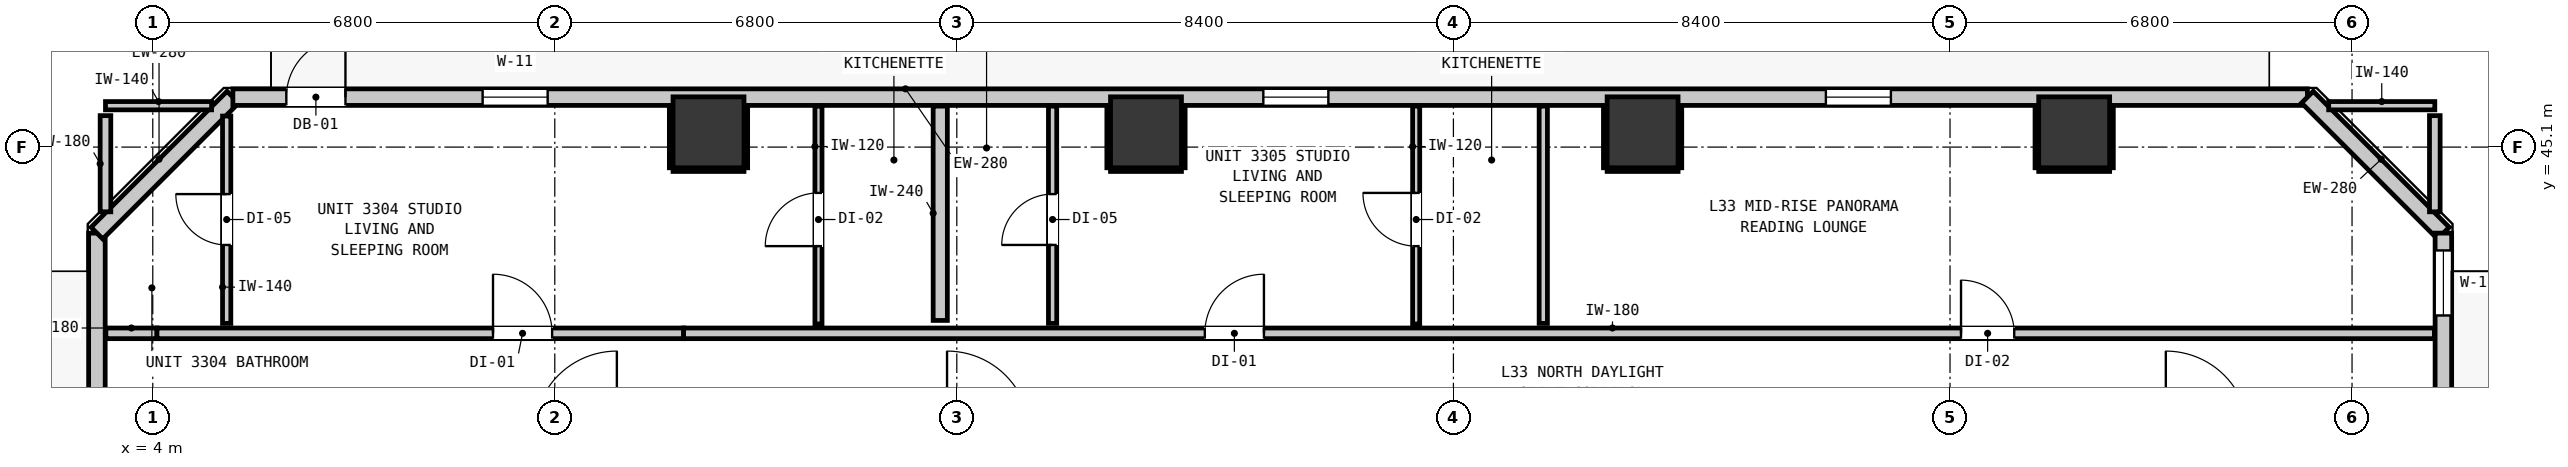
"""IFC4 building model, lengths in metres.
Left out: names, types, materials, properties, quantities, classifications, styles, units other than length and angle.
Written with IfcOpenShell. Run it as: python <this file> out.ifc"""

import sys

from ifc_helpers import new_model, si_unit, direction, frame, frame_2d, origin, origin_2d, place, context, subcontext, project, spatial, rectangle, extrude, element, fill, save


model = new_model("IFC4")
c1 = context("Model", 3, precision=1e-05, world=origin(), true_north=direction((0.0, 1.0)))
c2 = subcontext(c1, "Body", "Model", "MODEL_VIEW")
j1 = project(units=[si_unit("LENGTHUNIT", "METRE"), si_unit("PLANEANGLEUNIT", "RADIAN")], contexts=[c1])
p1 = place(None, origin())
s1 = spatial("IfcSite", under=j1, at=p1, CompositionType="ELEMENT")
p2 = place(p1, origin())
s2 = spatial("IfcBuilding", under=s1, at=p2, CompositionType="ELEMENT")
p3 = place(p2, frame((0.0, 0.0, 116.04)))
s3 = spatial("IfcBuildingStorey", under=s2, at=p3, CompositionType="ELEMENT", Elevation=116.04)
for number, where, z_axis, x_axis in (
    (1, (13.4, 45.35, 0.0), (0.0, 0.0, 1.0), (1.0, 0.0, 0.0)),
    (2, (20.8, 45.35, 0.0), (0.0, 0.0, 1.0), (1.0, 0.0, 0.0)),
    (3, (29.2, 45.35, 0.0), (0.0, 0.0, 1.0), (1.0, 0.0, 0.0)),
    (4, (36.5, 45.35, 0.0), (0.0, 0.0, 1.0), (1.0, 0.0, 0.0)),
):
    element("IfcColumn", number, at=place(p3, frame(where, z_axis=z_axis, x_axis=x_axis)), inside=s3, PredefinedType="COLUMN", context=c2, shape_type="SweptSolid", body=[
        extrude(rectangle(XDim=1.2, YDim=1.2, at=origin_2d()), origin(), (0.0, 0.0, 1.0), 3.32),
    ])
p4 = place(p3, frame((3.055, 11.355, 0.0), z_axis=(0.0, 0.0, 1.0), x_axis=(0.0, 1.0, 0.0)))
e5 = element("IfcWall", 5, at=p4, inside=s3, PredefinedType="STANDARD", context=c2, shape_type="SweptSolid", body=[
    extrude(rectangle(XDim=32.29, YDim=0.28, at=frame_2d((16.145, 0.0))), origin(), (0.0, 0.0, 1.0), 3.08),
])
p5 = place(p4, frame((5.818, 0.0, 0.0)))
e6 = element("IfcOpeningElement", 6, at=p5, cuts=e5, PredefinedType="OPENING", context=c2, shape_type="SweptSolid", body=[
    extrude(rectangle(XDim=1.0, YDim=2.15, at=frame_2d((0.5, 1.075))), frame((0.0, 0.15, 0.0), z_axis=(0.0, -1.0, 0.0), x_axis=(1.0, 0.0, 0.0)), (0.0, 0.0, 1.0), 0.3),
])
p6 = place(p4, frame((0.52, 0.0, 0.85)))
e7 = element("IfcOpeningElement", 7, at=p6, cuts=e5, PredefinedType="OPENING", context=c2, shape_type="SweptSolid", body=[
    extrude(rectangle(XDim=1.1, YDim=2.05, at=frame_2d((0.55, 1.025))), frame((0.0, 0.15, 0.0), z_axis=(0.0, -1.0, 0.0), x_axis=(1.0, 0.0, 0.0)), (0.0, 0.0, 1.0), 0.3),
])
p7 = place(p4, frame((20.905, 0.0, 0.85)))
e8 = element("IfcOpeningElement", 8, at=p7, cuts=e5, PredefinedType="OPENING", context=c2, shape_type="SweptSolid", body=[
    extrude(rectangle(XDim=1.1, YDim=2.05, at=frame_2d((0.55, 1.025))), frame((0.0, 0.15, 0.0), z_axis=(0.0, -1.0, 0.0), x_axis=(1.0, 0.0, 0.0)), (0.0, 0.0, 1.0), 0.3),
])
p8 = place(p4, frame((12.735, 0.0, 0.85)))
e9 = element("IfcOpeningElement", 9, at=p8, cuts=e5, PredefinedType="OPENING", context=c2, shape_type="SweptSolid", body=[
    extrude(rectangle(XDim=1.1, YDim=2.05, at=frame_2d((0.55, 1.025))), frame((0.0, 0.15, 0.0), z_axis=(0.0, -1.0, 0.0), x_axis=(1.0, 0.0, 0.0)), (0.0, 0.0, 1.0), 0.3),
])
p9 = place(p4, frame((24.855, 0.0, 0.85)))
e10 = element("IfcOpeningElement", 10, at=p9, cuts=e5, PredefinedType="OPENING", context=c2, shape_type="SweptSolid", body=[
    extrude(rectangle(XDim=1.1, YDim=2.05, at=frame_2d((0.55, 1.025))), frame((0.0, 0.15, 0.0), z_axis=(0.0, -1.0, 0.0), x_axis=(1.0, 0.0, 0.0)), (0.0, 0.0, 1.0), 0.3),
])
p10 = place(p3, frame((3.055, 43.645, 0.0), z_axis=(0.0, 0.0, 1.0), x_axis=(0.707106781187, 0.707106781187, 0.0)))
e11 = element("IfcWall", 11, at=p10, inside=s3, PredefinedType="STANDARD", context=c2, shape_type="SweptSolid", body=[
    extrude(rectangle(XDim=3.253, YDim=0.28, at=frame_2d((1.626, 0.0))), origin(), (0.0, 0.0, 1.0), 3.08),
])
p11 = place(p3, frame((5.355, 45.945, 0.0), z_axis=(0.0, 0.0, 1.0), x_axis=(1.0, 0.0, 0.0)))
e12 = element("IfcWall", 12, at=p11, inside=s3, PredefinedType="STANDARD", context=c2, shape_type="SweptSolid", body=[
    extrude(rectangle(XDim=35.09, YDim=0.28, at=frame_2d((17.545, 0.0))), origin(), (0.0, 0.0, 1.0), 3.08),
])
p12 = place(p11, frame((0.904, 0.0, 0.0)))
e13 = element("IfcOpeningElement", 13, at=p12, cuts=e12, PredefinedType="OPENING", context=c2, shape_type="SweptSolid", body=[
    extrude(rectangle(XDim=1.0, YDim=2.15, at=frame_2d((0.5, 1.075))), frame((0.0, 0.15, 0.0), z_axis=(0.0, -1.0, 0.0), x_axis=(1.0, 0.0, 0.0)), (0.0, 0.0, 1.0), 0.3),
])
p13 = place(p11, frame((4.224, 0.0, 0.85)))
e14 = element("IfcOpeningElement", 14, at=p13, cuts=e12, PredefinedType="OPENING", context=c2, shape_type="SweptSolid", body=[
    extrude(rectangle(XDim=1.1, YDim=2.05, at=frame_2d((0.55, 1.025))), frame((0.0, 0.15, 0.0), z_axis=(0.0, -1.0, 0.0), x_axis=(1.0, 0.0, 0.0)), (0.0, 0.0, 1.0), 0.3),
])
p14 = place(p11, frame((17.43, 0.0, 0.85)))
e15 = element("IfcOpeningElement", 15, at=p14, cuts=e12, PredefinedType="OPENING", context=c2, shape_type="SweptSolid", body=[
    extrude(rectangle(XDim=1.1, YDim=2.05, at=frame_2d((0.55, 1.025))), frame((0.0, 0.15, 0.0), z_axis=(0.0, -1.0, 0.0), x_axis=(1.0, 0.0, 0.0)), (0.0, 0.0, 1.0), 0.3),
])
p15 = place(p11, frame((26.945, 0.0, 0.85)))
e16 = element("IfcOpeningElement", 16, at=p15, cuts=e12, PredefinedType="OPENING", context=c2, shape_type="SweptSolid", body=[
    extrude(rectangle(XDim=1.1, YDim=2.05, at=frame_2d((0.55, 1.025))), frame((0.0, 0.15, 0.0), z_axis=(0.0, -1.0, 0.0), x_axis=(1.0, 0.0, 0.0)), (0.0, 0.0, 1.0), 0.3),
])
p16 = place(p3, frame((40.445, 45.945, 0.0), z_axis=(0.0, 0.0, 1.0), x_axis=(0.707106781187, -0.707106781187, 0.0)))
e17 = element("IfcWall", 17, at=p16, inside=s3, PredefinedType="STANDARD", context=c2, shape_type="SweptSolid", body=[
    extrude(rectangle(XDim=3.253, YDim=0.28, at=frame_2d((1.626, 0.0))), origin(), (0.0, 0.0, 1.0), 3.08),
])
p17 = place(p3, frame((42.745, 43.645, 0.0), z_axis=(0.0, 0.0, 1.0), x_axis=(0.0, -1.0, 0.0)))
e18 = element("IfcWall", 18, at=p17, inside=s3, PredefinedType="STANDARD", context=c2, shape_type="SweptSolid", body=[
    extrude(rectangle(XDim=32.29, YDim=0.28, at=frame_2d((16.145, 0.0))), origin(), (0.0, 0.0, 1.0), 3.08),
])
p18 = place(p17, frame((5.467, 0.0, 0.0)))
e19 = element("IfcOpeningElement", 19, at=p18, cuts=e18, PredefinedType="OPENING", context=c2, shape_type="SweptSolid", body=[
    extrude(rectangle(XDim=1.0, YDim=2.15, at=frame_2d((0.5, 1.075))), frame((0.0, 0.15, 0.0), z_axis=(0.0, -1.0, 0.0), x_axis=(1.0, 0.0, 0.0)), (0.0, 0.0, 1.0), 0.3),
])
p19 = place(p17, frame((0.293, 0.0, 0.85)))
e20 = element("IfcOpeningElement", 20, at=p19, cuts=e18, PredefinedType="OPENING", context=c2, shape_type="SweptSolid", body=[
    extrude(rectangle(XDim=1.1, YDim=2.05, at=frame_2d((0.55, 1.025))), frame((0.0, 0.15, 0.0), z_axis=(0.0, -1.0, 0.0), x_axis=(1.0, 0.0, 0.0)), (0.0, 0.0, 1.0), 0.3),
])
p20 = place(p17, frame((14.773, 0.0, 0.85)))
e21 = element("IfcOpeningElement", 21, at=p20, cuts=e18, PredefinedType="OPENING", context=c2, shape_type="SweptSolid", body=[
    extrude(rectangle(XDim=1.1, YDim=2.05, at=frame_2d((0.55, 1.025))), frame((0.0, 0.15, 0.0), z_axis=(0.0, -1.0, 0.0), x_axis=(1.0, 0.0, 0.0)), (0.0, 0.0, 1.0), 0.3),
])
p21 = place(p3, frame((3.207, 41.95, 0.0), z_axis=(0.0, 0.0, 1.0), x_axis=(1.0, 0.0, 0.0)))
e22 = element("IfcWall", 22, at=p21, inside=s3, PredefinedType="PARTITIONING", context=c2, shape_type="SweptSolid", body=[
    extrude(rectangle(XDim=0.864, YDim=0.18, at=frame_2d((0.432, 0.0))), origin(), (0.0, 0.0, 1.0), 3.08),
])
p22 = place(p3, frame((4.071, 41.95, 0.0), z_axis=(0.0, 0.0, 1.0), x_axis=(1.0, 0.0, 0.0)))
e23 = element("IfcWall", 23, at=p22, inside=s3, PredefinedType="PARTITIONING", context=c2, shape_type="SweptSolid", body=[
    extrude(rectangle(XDim=8.908, YDim=0.18, at=frame_2d((4.454, 0.0))), origin(), (0.0, 0.0, 1.0), 2.565),
])
p23 = place(p22, frame((5.684, 0.0, 0.0)))
e24 = element("IfcOpeningElement", 24, at=p23, cuts=e23, PredefinedType="OPENING", context=c2, shape_type="SweptSolid", body=[
    extrude(rectangle(XDim=1.0, YDim=2.15, at=frame_2d((0.5, 1.075))), frame((0.0, 0.1, 0.0), z_axis=(0.0, -1.0, 0.0), x_axis=(1.0, 0.0, 0.0)), (0.0, 0.0, 1.0), 0.2),
])
p24 = place(p3, frame((12.979, 41.95, 0.0), z_axis=(0.0, 0.0, 1.0), x_axis=(1.0, 0.0, 0.0)))
e25 = element("IfcWall", 25, at=p24, inside=s3, PredefinedType="PARTITIONING", context=c2, shape_type="SweptSolid", body=[
    extrude(rectangle(XDim=29.614, YDim=0.18, at=frame_2d((14.807, 0.0))), origin(), (0.0, 0.0, 1.0), 3.08),
])
p25 = place(p24, frame((8.816, 0.0, 0.0)))
e26 = element("IfcOpeningElement", 26, at=p25, cuts=e25, PredefinedType="OPENING", context=c2, shape_type="SweptSolid", body=[
    extrude(rectangle(XDim=1.0, YDim=2.15, at=frame_2d((0.5, 1.075))), frame((0.0, 0.1, 0.0), z_axis=(0.0, -1.0, 0.0), x_axis=(1.0, 0.0, 0.0)), (0.0, 0.0, 1.0), 0.2),
])
p26 = place(p24, frame((21.607, 0.0, 0.0)))
e27 = element("IfcOpeningElement", 27, at=p26, cuts=e25, PredefinedType="OPENING", context=c2, shape_type="SweptSolid", body=[
    extrude(rectangle(XDim=0.9, YDim=2.1, at=frame_2d((0.45, 1.05))), frame((0.0, 0.1, 0.0), z_axis=(0.0, -1.0, 0.0), x_axis=(1.0, 0.0, 0.0)), (0.0, 0.0, 1.0), 0.2),
])
for number, where, z_axis, x_axis in (
    (28, (3.2, 45.8, 0.0), (0.0, 0.0, 1.0), (1.0, 0.0, 0.0)),
    (29, (40.805, 45.8, 0.0), (0.0, 0.0, 1.0), (1.0, 0.0, 0.0)),
):
    element("IfcWall", number, at=place(p3, frame(where, z_axis=z_axis, x_axis=x_axis)), inside=s3, PredefinedType="PARTITIONING", context=c2, shape_type="SweptSolid", body=[
        extrude(rectangle(XDim=1.795, YDim=0.14, at=frame_2d((0.897, 0.0))), origin(), (0.0, 0.0, 1.0), 3.08),
    ])
p27 = place(p3, frame((17.32, 42.168, 0.0), z_axis=(0.0, 0.0, 1.0), x_axis=(0.0, 1.0, 0.0)))
e30 = element("IfcWall", 30, at=p27, inside=s3, PredefinedType="PARTITIONING", context=c2, shape_type="SweptSolid", body=[
    extrude(rectangle(XDim=3.625, YDim=0.24, at=frame_2d((1.812, 0.0))), origin(), (0.0, 0.0, 1.0), 3.08),
])
for number, where, z_axis, x_axis in (
    (31, (3.2, 44.005, 0.0), (0.0, 0.0, 1.0), (0.0, 1.0, 0.0)),
    (32, (42.6, 44.005, 0.0), (0.0, 0.0, 1.0), (0.0, 1.0, 0.0)),
):
    element("IfcWall", number, at=place(p3, frame(where, z_axis=z_axis, x_axis=x_axis)), inside=s3, PredefinedType="PARTITIONING", context=c2, shape_type="SweptSolid", body=[
        extrude(rectangle(XDim=1.627, YDim=0.18, at=frame_2d((0.813, 0.0))), origin(), (0.0, 0.0, 1.0), 3.08),
    ])
p28 = place(p3, frame((5.25, 42.118, 0.0), z_axis=(0.0, 0.0, 1.0), x_axis=(0.0, 1.0, 0.0)))
e33 = element("IfcWall", 33, at=p28, inside=s3, PredefinedType="PARTITIONING", context=c2, shape_type="SweptSolid", body=[
    extrude(rectangle(XDim=3.507, YDim=0.14, at=frame_2d((1.753, 0.0))), origin(), (0.0, 0.0, 1.0), 3.08),
])
p29 = place(p28, frame((1.327, 0.0, 0.0)))
e34 = element("IfcOpeningElement", 34, at=p29, cuts=e33, PredefinedType="OPENING", context=c2, shape_type="SweptSolid", body=[
    extrude(rectangle(XDim=0.86, YDim=2.02, at=frame_2d((0.43, 1.01))), frame((0.0, 0.08, 0.0), z_axis=(0.0, -1.0, 0.0), x_axis=(1.0, 0.0, 0.0)), (0.0, 0.0, 1.0), 0.16),
])
p30 = place(p3, frame((19.22, 42.118, 0.0), z_axis=(0.0, 0.0, 1.0), x_axis=(0.0, 1.0, 0.0)))
e35 = element("IfcWall", 35, at=p30, inside=s3, PredefinedType="PARTITIONING", context=c2, shape_type="SweptSolid", body=[
    extrude(rectangle(XDim=3.675, YDim=0.14, at=frame_2d((1.837, 0.0))), origin(), (0.0, 0.0, 1.0), 3.08),
])
p31 = place(p30, frame((1.327, 0.0, 0.0)))
e36 = element("IfcOpeningElement", 36, at=p31, cuts=e35, PredefinedType="OPENING", context=c2, shape_type="SweptSolid", body=[
    extrude(rectangle(XDim=0.86, YDim=2.02, at=frame_2d((0.43, 1.01))), frame((0.0, 0.08, 0.0), z_axis=(0.0, -1.0, 0.0), x_axis=(1.0, 0.0, 0.0)), (0.0, 0.0, 1.0), 0.16),
])
p32 = place(p3, frame((27.52, 42.118, 0.0), z_axis=(0.0, 0.0, 1.0), x_axis=(0.0, 1.0, 0.0)))
e37 = element("IfcWall", 37, at=p32, inside=s3, PredefinedType="PARTITIONING", context=c2, shape_type="SweptSolid", body=[
    extrude(rectangle(XDim=3.675, YDim=0.14, at=frame_2d((1.837, 0.0))), origin(), (0.0, 0.0, 1.0), 3.08),
])
p33 = place(p3, frame((15.26, 42.108, 0.0), z_axis=(0.0, 0.0, 1.0), x_axis=(0.0, 1.0, 0.0)))
e38 = element("IfcWall", 38, at=p33, inside=s3, PredefinedType="PARTITIONING", context=c2, shape_type="SweptSolid", body=[
    extrude(rectangle(XDim=3.685, YDim=0.12, at=frame_2d((1.843, 0.0))), origin(), (0.0, 0.0, 1.0), 3.08),
])
p34 = place(p33, frame((1.317, 0.0, 0.0)))
e39 = element("IfcOpeningElement", 39, at=p34, cuts=e38, PredefinedType="OPENING", context=c2, shape_type="SweptSolid", body=[
    extrude(rectangle(XDim=0.9, YDim=2.1, at=frame_2d((0.45, 1.05))), frame((0.0, 0.07, 0.0), z_axis=(0.0, -1.0, 0.0), x_axis=(1.0, 0.0, 0.0)), (0.0, 0.0, 1.0), 0.14),
])
p35 = place(p3, frame((25.37, 42.108, 0.0), z_axis=(0.0, 0.0, 1.0), x_axis=(0.0, 1.0, 0.0)))
e40 = element("IfcWall", 40, at=p35, inside=s3, PredefinedType="PARTITIONING", context=c2, shape_type="SweptSolid", body=[
    extrude(rectangle(XDim=3.685, YDim=0.12, at=frame_2d((1.843, 0.0))), origin(), (0.0, 0.0, 1.0), 3.08),
])
p36 = place(p35, frame((1.317, 0.0, 0.0)))
e41 = element("IfcOpeningElement", 41, at=p36, cuts=e40, PredefinedType="OPENING", context=c2, shape_type="SweptSolid", body=[
    extrude(rectangle(XDim=0.9, YDim=2.1, at=frame_2d((0.45, 1.05))), frame((0.0, 0.07, 0.0), z_axis=(0.0, -1.0, 0.0), x_axis=(1.0, 0.0, 0.0)), (0.0, 0.0, 1.0), 0.14),
])
p37 = place(p3, frame((12.8, 44.718, 0.0), z_axis=(0.0, 0.0, 1.0), x_axis=(1.0, 0.0, 0.0)))
e42 = element("IfcWall", 42, at=p37, inside=s3, PredefinedType="PARTITIONING", context=c2, shape_type="SweptSolid", body=[
    extrude(rectangle(XDim=1.2, YDim=0.06, at=frame_2d((0.6, 0.0))), origin(), (0.0, 0.0, 1.0), 1.45),
])
for number, where, z_axis, x_axis in (
    (43, (12.768, 44.75, 0.0), (0.0, 0.0, 1.0), (0.0, 1.0, 0.0)),
    (44, (14.032, 44.75, 0.0), (0.0, 0.0, 1.0), (0.0, 1.0, 0.0)),
):
    element("IfcWall", number, at=place(p3, frame(where, z_axis=z_axis, x_axis=x_axis)), inside=s3, PredefinedType="PARTITIONING", context=c2, shape_type="SweptSolid", body=[
        extrude(rectangle(XDim=1.04, YDim=0.06, at=frame_2d((0.52, 0.0))), origin(), (0.0, 0.0, 1.0), 1.45),
    ])
p38 = place(p3, frame((20.2, 44.718, 0.0), z_axis=(0.0, 0.0, 1.0), x_axis=(1.0, 0.0, 0.0)))
e45 = element("IfcWall", 45, at=p38, inside=s3, PredefinedType="PARTITIONING", context=c2, shape_type="SweptSolid", body=[
    extrude(rectangle(XDim=1.2, YDim=0.06, at=frame_2d((0.6, 0.0))), origin(), (0.0, 0.0, 1.0), 1.45),
])
for number, where, z_axis, x_axis in (
    (46, (20.168, 44.75, 0.0), (0.0, 0.0, 1.0), (0.0, 1.0, 0.0)),
    (47, (21.432, 44.75, 0.0), (0.0, 0.0, 1.0), (0.0, 1.0, 0.0)),
):
    element("IfcWall", number, at=place(p3, frame(where, z_axis=z_axis, x_axis=x_axis)), inside=s3, PredefinedType="PARTITIONING", context=c2, shape_type="SweptSolid", body=[
        extrude(rectangle(XDim=1.04, YDim=0.06, at=frame_2d((0.52, 0.0))), origin(), (0.0, 0.0, 1.0), 1.45),
    ])
p39 = place(p3, frame((28.6, 44.718, 0.0), z_axis=(0.0, 0.0, 1.0), x_axis=(1.0, 0.0, 0.0)))
e48 = element("IfcWall", 48, at=p39, inside=s3, PredefinedType="PARTITIONING", context=c2, shape_type="SweptSolid", body=[
    extrude(rectangle(XDim=1.2, YDim=0.06, at=frame_2d((0.6, 0.0))), origin(), (0.0, 0.0, 1.0), 1.45),
])
for number, where, z_axis, x_axis in (
    (49, (28.568, 44.75, 0.0), (0.0, 0.0, 1.0), (0.0, 1.0, 0.0)),
    (50, (29.832, 44.75, 0.0), (0.0, 0.0, 1.0), (0.0, 1.0, 0.0)),
):
    element("IfcWall", number, at=place(p3, frame(where, z_axis=z_axis, x_axis=x_axis)), inside=s3, PredefinedType="PARTITIONING", context=c2, shape_type="SweptSolid", body=[
        extrude(rectangle(XDim=1.04, YDim=0.06, at=frame_2d((0.52, 0.0))), origin(), (0.0, 0.0, 1.0), 1.45),
    ])
p40 = place(p3, frame((35.9, 44.718, 0.0), z_axis=(0.0, 0.0, 1.0), x_axis=(1.0, 0.0, 0.0)))
e51 = element("IfcWall", 51, at=p40, inside=s3, PredefinedType="PARTITIONING", context=c2, shape_type="SweptSolid", body=[
    extrude(rectangle(XDim=1.2, YDim=0.06, at=frame_2d((0.6, 0.0))), origin(), (0.0, 0.0, 1.0), 1.45),
])
for number, where, z_axis, x_axis in (
    (52, (35.868, 44.75, 0.0), (0.0, 0.0, 1.0), (0.0, 1.0, 0.0)),
    (53, (37.132, 44.75, 0.0), (0.0, 0.0, 1.0), (0.0, 1.0, 0.0)),
):
    element("IfcWall", number, at=place(p3, frame(where, z_axis=z_axis, x_axis=x_axis)), inside=s3, PredefinedType="PARTITIONING", context=c2, shape_type="SweptSolid", body=[
        extrude(rectangle(XDim=1.04, YDim=0.06, at=frame_2d((0.52, 0.0))), origin(), (0.0, 0.0, 1.0), 1.45),
    ])
p41 = place(p12, origin())
e54 = element("IfcDoor", 54, at=p41, inside=s3, OperationType="SINGLE_SWING_RIGHT", PredefinedType="DOOR", context=c2, shape_type="SweptSolid", body=[
    extrude(rectangle(XDim=1.0, YDim=2.15, at=frame_2d((0.5, 1.075))), frame((0.0, 0.025, 0.0), z_axis=(0.0, -1.0, 0.0), x_axis=(1.0, 0.0, 0.0)), (0.0, 0.0, 1.0), 0.05),
])
fill(e13, e54)
p42 = place(p13, origin())
e55 = element("IfcWindow", 55, at=p42, inside=s3, PartitioningType="SINGLE_PANEL", PredefinedType="WINDOW", context=c2, shape_type="SweptSolid", body=[
    extrude(rectangle(XDim=1.1, YDim=2.05, at=frame_2d((0.55, 1.025))), frame((0.0, 0.03, 0.0), z_axis=(0.0, -1.0, 0.0), x_axis=(1.0, 0.0, 0.0)), (0.0, 0.0, 1.0), 0.06),
])
fill(e14, e55)
p43 = place(p14, origin())
e56 = element("IfcWindow", 56, at=p43, inside=s3, PartitioningType="SINGLE_PANEL", PredefinedType="WINDOW", context=c2, shape_type="SweptSolid", body=[
    extrude(rectangle(XDim=1.1, YDim=2.05, at=frame_2d((0.55, 1.025))), frame((0.0, 0.03, 0.0), z_axis=(0.0, -1.0, 0.0), x_axis=(1.0, 0.0, 0.0)), (0.0, 0.0, 1.0), 0.06),
])
fill(e15, e56)
p44 = place(p15, origin())
e57 = element("IfcWindow", 57, at=p44, inside=s3, PartitioningType="SINGLE_PANEL", PredefinedType="WINDOW", context=c2, shape_type="SweptSolid", body=[
    extrude(rectangle(XDim=1.1, YDim=2.05, at=frame_2d((0.55, 1.025))), frame((0.0, 0.03, 0.0), z_axis=(0.0, -1.0, 0.0), x_axis=(1.0, 0.0, 0.0)), (0.0, 0.0, 1.0), 0.06),
])
fill(e16, e57)
p45 = place(p19, origin())
e58 = element("IfcWindow", 58, at=p45, inside=s3, PartitioningType="SINGLE_PANEL", PredefinedType="WINDOW", context=c2, shape_type="SweptSolid", body=[
    extrude(rectangle(XDim=1.1, YDim=2.05, at=frame_2d((0.55, 1.025))), frame((0.0, 0.03, 0.0), z_axis=(0.0, -1.0, 0.0), x_axis=(1.0, 0.0, 0.0)), (0.0, 0.0, 1.0), 0.06),
])
fill(e20, e58)
p46 = place(p23, origin())
e59 = element("IfcDoor", 59, at=p46, inside=s3, OperationType="SINGLE_SWING_LEFT", PredefinedType="DOOR", context=c2, shape_type="SweptSolid", body=[
    extrude(rectangle(XDim=1.0, YDim=2.15, at=frame_2d((0.5, 1.075))), frame((0.0, 0.025, 0.0), z_axis=(0.0, -1.0, 0.0), x_axis=(1.0, 0.0, 0.0)), (0.0, 0.0, 1.0), 0.05),
])
fill(e24, e59)
p47 = place(p29, origin())
e60 = element("IfcDoor", 60, at=p47, inside=s3, OperationType="SINGLE_SWING_RIGHT", PredefinedType="DOOR", context=c2, shape_type="SweptSolid", body=[
    extrude(rectangle(XDim=0.86, YDim=2.02, at=frame_2d((0.43, 1.01))), frame((0.0, 0.025, 0.0), z_axis=(0.0, -1.0, 0.0), x_axis=(1.0, 0.0, 0.0)), (0.0, 0.0, 1.0), 0.05),
])
fill(e34, e60)
p48 = place(p34, origin())
e61 = element("IfcDoor", 61, at=p48, inside=s3, OperationType="SINGLE_SWING_LEFT", PredefinedType="DOOR", context=c2, shape_type="SweptSolid", body=[
    extrude(rectangle(XDim=0.9, YDim=2.1, at=frame_2d((0.45, 1.05))), frame((0.0, 0.025, 0.0), z_axis=(0.0, -1.0, 0.0), x_axis=(1.0, 0.0, 0.0)), (0.0, 0.0, 1.0), 0.05),
])
fill(e39, e61)
p49 = place(p25, origin())
e62 = element("IfcDoor", 62, at=p49, inside=s3, OperationType="SINGLE_SWING_RIGHT", PredefinedType="DOOR", context=c2, shape_type="SweptSolid", body=[
    extrude(rectangle(XDim=1.0, YDim=2.15, at=frame_2d((0.5, 1.075))), frame((0.0, 0.025, 0.0), z_axis=(0.0, -1.0, 0.0), x_axis=(1.0, 0.0, 0.0)), (0.0, 0.0, 1.0), 0.05),
])
fill(e26, e62)
p50 = place(p31, origin())
e63 = element("IfcDoor", 63, at=p50, inside=s3, OperationType="SINGLE_SWING_LEFT", PredefinedType="DOOR", context=c2, shape_type="SweptSolid", body=[
    extrude(rectangle(XDim=0.86, YDim=2.02, at=frame_2d((0.43, 1.01))), frame((0.0, 0.025, 0.0), z_axis=(0.0, -1.0, 0.0), x_axis=(1.0, 0.0, 0.0)), (0.0, 0.0, 1.0), 0.05),
])
fill(e36, e63)
p51 = place(p36, origin())
e64 = element("IfcDoor", 64, at=p51, inside=s3, OperationType="SINGLE_SWING_RIGHT", PredefinedType="DOOR", context=c2, shape_type="SweptSolid", body=[
    extrude(rectangle(XDim=0.9, YDim=2.1, at=frame_2d((0.45, 1.05))), frame((0.0, 0.025, 0.0), z_axis=(0.0, -1.0, 0.0), x_axis=(1.0, 0.0, 0.0)), (0.0, 0.0, 1.0), 0.05),
])
fill(e41, e64)
p52 = place(p26, origin())
e65 = element("IfcDoor", 65, at=p52, inside=s3, OperationType="SINGLE_SWING_LEFT", PredefinedType="DOOR", context=c2, shape_type="SweptSolid", body=[
    extrude(rectangle(XDim=0.9, YDim=2.1, at=frame_2d((0.45, 1.05))), frame((0.0, 0.025, 0.0), z_axis=(0.0, -1.0, 0.0), x_axis=(1.0, 0.0, 0.0)), (0.0, 0.0, 1.0), 0.05),
])
fill(e27, e65)
save(model, sys.argv[1])
